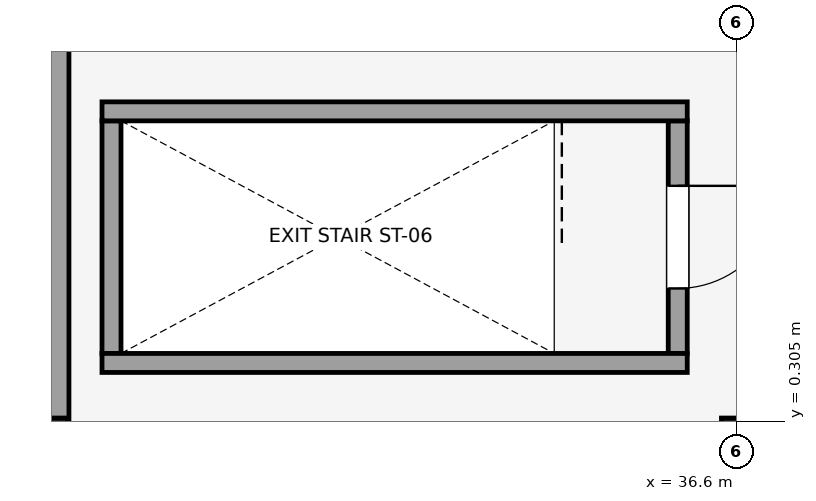
"""IFC4 building model, lengths in metres.
Left out: names, types, materials, properties, quantities, classifications, styles, units other than length and angle.
Written with IfcOpenShell. Run it as: python <this file> out.ifc"""

import sys

from ifc_helpers import new_model, si_unit, direction, frame, frame_2d, origin, origin_2d, place, context, subcontext, project, spatial, rectangle, extrude, element, fill, save


model = new_model("IFC4")
c1 = context("Model", 3, precision=1e-05, world=origin(), true_north=direction((0.0, 1.0)))
c2 = subcontext(c1, "Body", "Model", "MODEL_VIEW")
j1 = project(units=[si_unit("LENGTHUNIT", "METRE"), si_unit("PLANEANGLEUNIT", "RADIAN")], contexts=[c1])
p1 = place(None, origin())
s1 = spatial("IfcSite", under=j1, at=p1, CompositionType="ELEMENT")
p2 = place(p1, origin())
s2 = spatial("IfcBuilding", under=s1, at=p2, CompositionType="ELEMENT")
p3 = place(p2, frame((0.0, 0.0, 4.5)))
s3 = spatial("IfcBuildingStorey", under=s2, at=p3, CompositionType="ELEMENT", Elevation=4.5)
for number, where, z_axis, x_axis in (
    (1, (27.6, 0.0, 0.0), (0.0, 0.0, 1.0), (1.0, 0.0, 0.0)),
    (2, (36.6, 0.0, 0.0), (0.0, 0.0, 1.0), (1.0, 0.0, 0.0)),
):
    element("IfcColumn", number, at=place(p3, frame(where, z_axis=z_axis, x_axis=x_axis)), inside=s3, PredefinedType="COLUMN", context=c2, shape_type="SweptSolid", body=[
        extrude(rectangle(XDim=0.4, YDim=0.7, at=origin_2d()), origin(), (0.0, 0.0, 1.0), 4.5),
    ])
p4 = place(p3, frame((27.6, 7.55, 0.0), z_axis=(0.0, 0.0, 1.0), x_axis=(0.0, -1.0, 0.0)))
e3 = element("IfcWall", 3, at=p4, inside=s3, PredefinedType="SOLIDWALL", context=c2, shape_type="SweptSolid", body=[
    extrude(rectangle(XDim=7.9, YDim=0.43, at=frame_2d((3.95, 0.0))), origin(), (0.0, 0.0, 1.0), 3.12),
])
p5 = place(p3, frame((35.825, 4.26, 0.0), z_axis=(0.0, 0.0, 1.0), x_axis=(0.0, -1.0, 0.0)))
e4 = element("IfcWall", 4, at=p5, inside=s3, PredefinedType="SHEAR", context=c2, shape_type="SweptSolid", body=[
    extrude(rectangle(XDim=3.06, YDim=0.25, at=frame_2d((1.53, 0.0))), origin(), (0.0, 0.0, 1.0), 4.5),
])
p6 = place(p5, frame((0.855, 0.0, 0.0)))
e5 = element("IfcOpeningElement", 5, at=p6, cuts=e4, PredefinedType="OPENING", context=c2, shape_type="SweptSolid", body=[
    extrude(rectangle(XDim=1.35, YDim=2.15, at=frame_2d((0.675, 1.075))), frame((0.0, 0.135, 0.0), z_axis=(0.0, -1.0, 0.0), x_axis=(1.0, 0.0, 0.0)), (0.0, 0.0, 1.0), 0.27),
])
p7 = place(p3, frame((28.375, 4.26, 0.0), z_axis=(0.0, 0.0, 1.0), x_axis=(0.0, -1.0, 0.0)))
e6 = element("IfcWall", 6, at=p7, inside=s3, PredefinedType="SHEAR", context=c2, shape_type="SweptSolid", body=[
    extrude(rectangle(XDim=3.06, YDim=0.25, at=frame_2d((1.53, 0.0))), origin(), (0.0, 0.0, 1.0), 4.5),
])
for number, where, z_axis, x_axis in (
    (7, (35.95, 4.385, 0.0), (0.0, 0.0, 1.0), (-1.0, 0.0, 0.0)),
    (8, (35.95, 1.075, 0.0), (0.0, 0.0, 1.0), (-1.0, 0.0, 0.0)),
):
    element("IfcWall", number, at=place(p3, frame(where, z_axis=z_axis, x_axis=x_axis)), inside=s3, PredefinedType="SHEAR", context=c2, shape_type="SweptSolid", body=[
        extrude(rectangle(XDim=7.7, YDim=0.25, at=frame_2d((3.85, 0.0))), origin(), (0.0, 0.0, 1.0), 4.5),
    ])
p8 = place(p6, origin())
e9 = element("IfcDoor", 9, at=p8, inside=s3, OperationType="SINGLE_SWING_LEFT", PredefinedType="DOOR", context=c2, shape_type="SweptSolid", body=[
    extrude(rectangle(XDim=1.35, YDim=2.15, at=frame_2d((0.675, 1.075))), frame((0.0, 0.025, 0.0), z_axis=(0.0, -1.0, 0.0), x_axis=(1.0, 0.0, 0.0)), (0.0, 0.0, 1.0), 0.05),
])
fill(e5, e9)
save(model, sys.argv[1])
